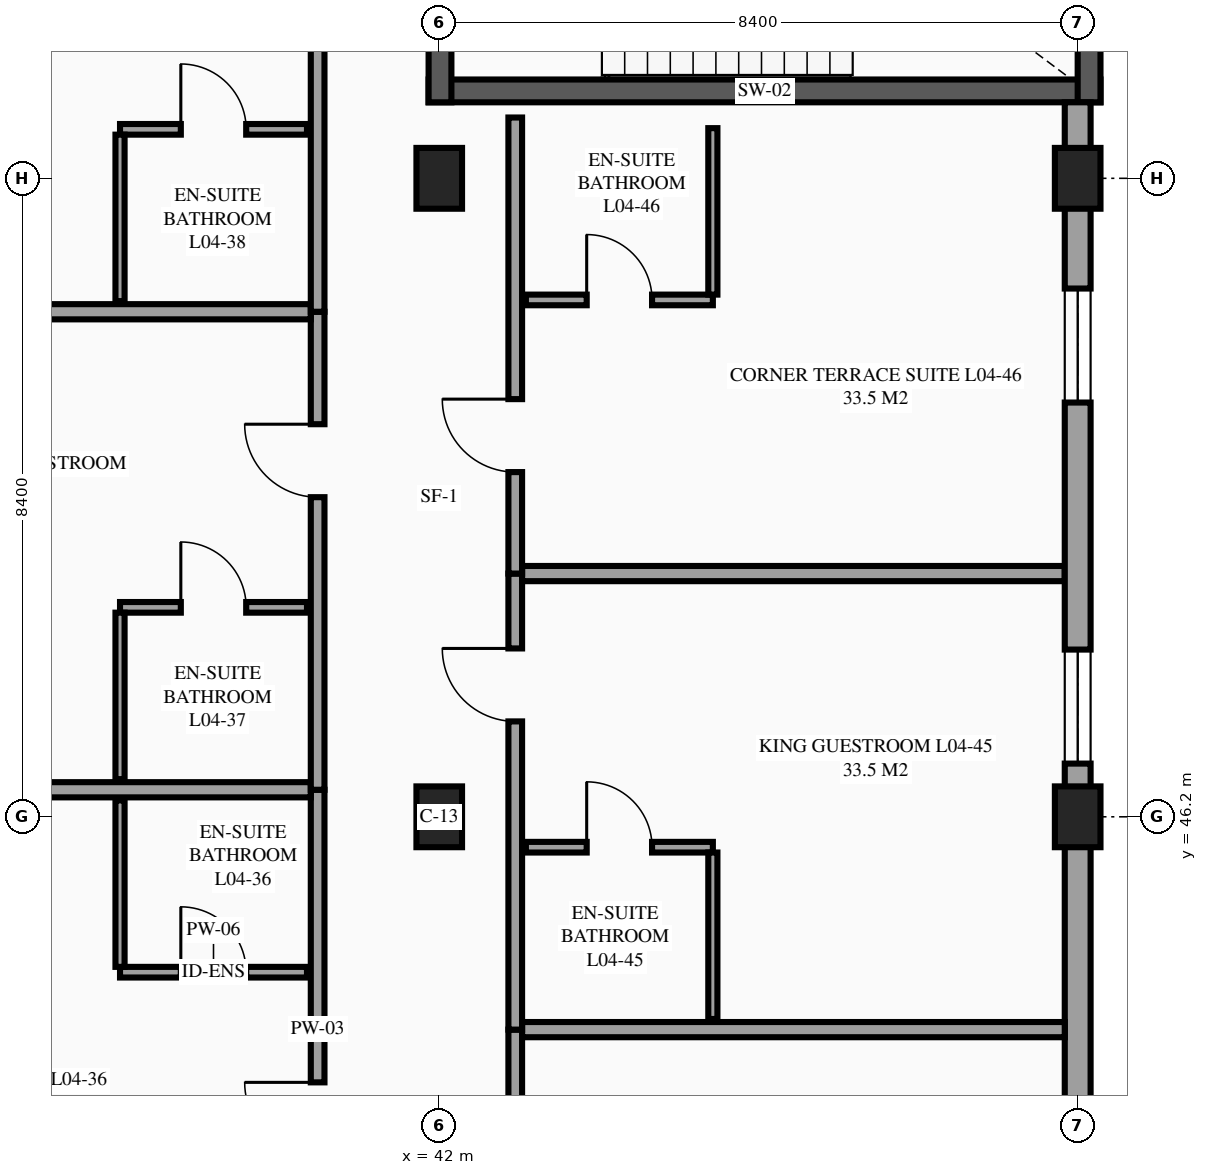
"""IFC4 building model, lengths in metres.
Left out: names, types, materials, properties, quantities, classifications, styles, units other than length and angle.
Written with IfcOpenShell. Run it as: python <this file> out.ifc"""

import sys

from ifc_helpers import new_model, si_unit, direction, frame, frame_2d, origin, origin_2d, place, context, subcontext, project, spatial, rectangle, extrude, element, fill, save


model = new_model("IFC4")
c1 = context("Model", 3, precision=1e-05, world=origin(), true_north=direction((0.0, 1.0)))
c2 = subcontext(c1, "Body", "Model", "MODEL_VIEW")
j1 = project(units=[si_unit("LENGTHUNIT", "METRE"), si_unit("PLANEANGLEUNIT", "RADIAN")], contexts=[c1])
p1 = place(None, origin())
s1 = spatial("IfcSite", under=j1, at=p1, CompositionType="ELEMENT")
p2 = place(p1, origin())
s2 = spatial("IfcBuilding", under=s1, at=p2, CompositionType="ELEMENT")
p3 = place(p2, frame((0.0, 0.0, 18.3)))
s3 = spatial("IfcBuildingStorey", under=s2, at=p3, CompositionType="ELEMENT", Elevation=18.3)
for number, where, z_axis, x_axis in (
    (1, (42.0, 46.2, 0.0), (0.0, 0.0, 1.0), (1.0, 0.0, 0.0)),
    (2, (42.0, 54.6, 0.0), (0.0, 0.0, 1.0), (1.0, 0.0, 0.0)),
    (3, (50.4, 46.2, 0.0), (0.0, 0.0, 1.0), (1.0, 0.0, 0.0)),
    (4, (50.4, 54.6, 0.0), (0.0, 0.0, 1.0), (1.0, 0.0, 0.0)),
):
    element("IfcColumn", number, at=place(p3, frame(where, z_axis=z_axis, x_axis=x_axis)), inside=s3, PredefinedType="COLUMN", context=c2, shape_type="SweptSolid", body=[
        extrude(rectangle(XDim=0.6, YDim=0.8, at=origin_2d()), origin(), (0.0, 0.0, 1.0), 3.6),
    ])
p4 = place(p3, frame((50.4, 37.8, 0.0), z_axis=(0.0, 0.0, 1.0), x_axis=(0.0, 1.0, 0.0)))
e5 = element("IfcWall", 5, at=p4, inside=s3, PredefinedType="STANDARD", context=c2, shape_type="SweptSolid", body=[
    extrude(rectangle(XDim=8.4, YDim=0.34, at=frame_2d((4.2, 0.0))), origin(), (0.0, 0.0, 1.0), 3.075),
])
p5 = place(p4, frame((1.85, 0.0, 0.85)))
e6 = element("IfcOpeningElement", 6, at=p5, cuts=e5, PredefinedType="OPENING", context=c2, shape_type="SweptSolid", body=[
    extrude(rectangle(XDim=1.5, YDim=1.5, at=frame_2d((0.75, 0.75))), frame((0.0, 0.18, 0.0), z_axis=(0.0, -1.0, 0.0), x_axis=(1.0, 0.0, 0.0)), (0.0, 0.0, 1.0), 0.36),
])
p6 = place(p3, frame((41.86, 55.75, 0.0), z_axis=(0.0, 0.0, 1.0), x_axis=(1.0, 0.0, 0.0)))
e7 = element("IfcWall", 7, at=p6, inside=s3, PredefinedType="SHEAR", context=c2, shape_type="SweptSolid", body=[
    extrude(rectangle(XDim=8.84, YDim=0.3, at=frame_2d((4.42, 0.0))), origin(), (0.0, 0.0, 1.0), 3.6),
])
p7 = place(p3, frame((50.55, 55.6, 0.0), z_axis=(0.0, 0.0, 1.0), x_axis=(0.0, 1.0, 0.0)))
e8 = element("IfcWall", 8, at=p7, inside=s3, PredefinedType="SHEAR", context=c2, shape_type="SweptSolid", body=[
    extrude(rectangle(XDim=5.2, YDim=0.3, at=frame_2d((2.6, 0.0))), origin(), (0.0, 0.0, 1.0), 3.6),
])
p8 = place(p3, frame((42.01, 60.8, 0.0), z_axis=(0.0, 0.0, 1.0), x_axis=(0.0, -1.0, 0.0)))
e9 = element("IfcWall", 9, at=p8, inside=s3, PredefinedType="SHEAR", context=c2, shape_type="SweptSolid", body=[
    extrude(rectangle(XDim=5.2, YDim=0.3, at=frame_2d((2.6, 0.0))), origin(), (0.0, 0.0, 1.0), 3.6),
])
p9 = place(p8, frame((3.0, 0.0, 0.0)))
e10 = element("IfcOpeningElement", 10, at=p9, cuts=e9, PredefinedType="OPENING", context=c2, shape_type="SweptSolid", body=[
    extrude(rectangle(XDim=1.15, YDim=2.15, at=frame_2d((0.575, 1.075))), frame((0.0, 0.16, 0.0), z_axis=(0.0, -1.0, 0.0), x_axis=(1.0, 0.0, 0.0)), (0.0, 0.0, 1.0), 0.32),
])
p10 = place(p3, frame((40.4, 40.267, 0.0), z_axis=(0.0, 0.0, 1.0), x_axis=(0.0, 1.0, 0.0)))
e11 = element("IfcWall", 11, at=p10, inside=s3, PredefinedType="PARTITIONING", context=c2, shape_type="SweptSolid", body=[
    extrude(rectangle(XDim=6.289, YDim=0.18, at=frame_2d((3.145, 0.0))), origin(), (0.0, 0.0, 1.0), 3.375),
])
p11 = place(p10, frame((1.479, 0.0, 0.0)))
e12 = element("IfcOpeningElement", 12, at=p11, cuts=e11, PredefinedType="OPENING", context=c2, shape_type="SweptSolid", body=[
    extrude(rectangle(XDim=0.96, YDim=2.15, at=frame_2d((0.48, 1.075))), frame((0.0, 0.1, 0.0), z_axis=(0.0, -1.0, 0.0), x_axis=(1.0, 0.0, 0.0)), (0.0, 0.0, 1.0), 0.2),
])
p12 = place(p3, frame((34.05, 46.556, 0.0), z_axis=(0.0, 0.0, 1.0), x_axis=(1.0, 0.0, 0.0)))
e13 = element("IfcWall", 13, at=p12, inside=s3, PredefinedType="PARTITIONING", context=c2, shape_type="SweptSolid", body=[
    extrude(rectangle(XDim=6.26, YDim=0.2, at=frame_2d((3.13, 0.0))), origin(), (0.0, 0.0, 1.0), 3.375),
])
p13 = place(p3, frame((37.8, 44.156, 0.0), z_axis=(0.0, 0.0, 1.0), x_axis=(1.0, 0.0, 0.0)))
e14 = element("IfcWall", 14, at=p13, inside=s3, PredefinedType="PARTITIONING", context=c2, shape_type="SweptSolid", body=[
    extrude(rectangle(XDim=2.46, YDim=0.14, at=frame_2d((1.23, 0.0))), origin(), (0.0, 0.0, 1.0), 3.375),
])
p14 = place(p13, frame((0.8, 0.0, 0.0)))
e15 = element("IfcOpeningElement", 15, at=p14, cuts=e14, PredefinedType="OPENING", context=c2, shape_type="SweptSolid", body=[
    extrude(rectangle(XDim=0.86, YDim=2.1, at=frame_2d((0.43, 1.05))), frame((0.0, 0.08, 0.0), z_axis=(0.0, -1.0, 0.0), x_axis=(1.0, 0.0, 0.0)), (0.0, 0.0, 1.0), 0.16),
])
p15 = place(p3, frame((37.8, 44.226, 0.0), z_axis=(0.0, 0.0, 1.0), x_axis=(0.0, 1.0, 0.0)))
e16 = element("IfcWall", 16, at=p15, inside=s3, PredefinedType="PARTITIONING", context=c2, shape_type="SweptSolid", body=[
    extrude(rectangle(XDim=2.19, YDim=0.12, at=frame_2d((1.095, 0.0))), origin(), (0.0, 0.0, 1.0), 3.375),
])
p16 = place(p3, frame((40.4, 46.556, 0.0), z_axis=(0.0, 0.0, 1.0), x_axis=(0.0, 1.0, 0.0)))
e17 = element("IfcWall", 17, at=p16, inside=s3, PredefinedType="PARTITIONING", context=c2, shape_type="SweptSolid", body=[
    extrude(rectangle(XDim=6.289, YDim=0.18, at=frame_2d((3.145, 0.0))), origin(), (0.0, 0.0, 1.0), 3.375),
])
p17 = place(p16, frame((3.849, 0.0, 0.0)))
e18 = element("IfcOpeningElement", 18, at=p17, cuts=e17, PredefinedType="OPENING", context=c2, shape_type="SweptSolid", body=[
    extrude(rectangle(XDim=0.96, YDim=2.15, at=frame_2d((0.48, 1.075))), frame((0.0, 0.1, 0.0), z_axis=(0.0, -1.0, 0.0), x_axis=(1.0, 0.0, 0.0)), (0.0, 0.0, 1.0), 0.2),
])
p18 = place(p3, frame((33.77, 52.844, 0.0), z_axis=(0.0, 0.0, 1.0), x_axis=(1.0, 0.0, 0.0)))
e19 = element("IfcWall", 19, at=p18, inside=s3, PredefinedType="PARTITIONING", context=c2, shape_type="SweptSolid", body=[
    extrude(rectangle(XDim=6.54, YDim=0.2, at=frame_2d((3.27, 0.0))), origin(), (0.0, 0.0, 1.0), 3.375),
])
p19 = place(p3, frame((37.8, 48.956, 0.0), z_axis=(0.0, 0.0, 1.0), x_axis=(1.0, 0.0, 0.0)))
e20 = element("IfcWall", 20, at=p19, inside=s3, PredefinedType="PARTITIONING", context=c2, shape_type="SweptSolid", body=[
    extrude(rectangle(XDim=2.46, YDim=0.14, at=frame_2d((1.23, 0.0))), origin(), (0.0, 0.0, 1.0), 3.375),
])
p20 = place(p19, frame((0.8, 0.0, 0.0)))
e21 = element("IfcOpeningElement", 21, at=p20, cuts=e20, PredefinedType="OPENING", context=c2, shape_type="SweptSolid", body=[
    extrude(rectangle(XDim=0.86, YDim=2.1, at=frame_2d((0.43, 1.05))), frame((0.0, 0.08, 0.0), z_axis=(0.0, -1.0, 0.0), x_axis=(1.0, 0.0, 0.0)), (0.0, 0.0, 1.0), 0.16),
])
p21 = place(p3, frame((37.8, 46.696, 0.0), z_axis=(0.0, 0.0, 1.0), x_axis=(0.0, 1.0, 0.0)))
e22 = element("IfcWall", 22, at=p21, inside=s3, PredefinedType="PARTITIONING", context=c2, shape_type="SweptSolid", body=[
    extrude(rectangle(XDim=2.19, YDim=0.12, at=frame_2d((1.095, 0.0))), origin(), (0.0, 0.0, 1.0), 3.375),
])
p22 = place(p3, frame((40.4, 52.844, 0.0), z_axis=(0.0, 0.0, 1.0), x_axis=(0.0, 1.0, 0.0)))
e23 = element("IfcWall", 23, at=p22, inside=s3, PredefinedType="PARTITIONING", context=c2, shape_type="SweptSolid", body=[
    extrude(rectangle(XDim=6.289, YDim=0.18, at=frame_2d((3.145, 0.0))), origin(), (0.0, 0.0, 1.0), 3.375),
])
p23 = place(p22, frame((3.85, 0.0, 0.0)))
e24 = element("IfcOpeningElement", 24, at=p23, cuts=e23, PredefinedType="OPENING", context=c2, shape_type="SweptSolid", body=[
    extrude(rectangle(XDim=0.96, YDim=2.15, at=frame_2d((0.48, 1.075))), frame((0.0, 0.1, 0.0), z_axis=(0.0, -1.0, 0.0), x_axis=(1.0, 0.0, 0.0)), (0.0, 0.0, 1.0), 0.2),
])
p24 = place(p3, frame((37.8, 55.244, 0.0), z_axis=(0.0, 0.0, 1.0), x_axis=(1.0, 0.0, 0.0)))
e25 = element("IfcWall", 25, at=p24, inside=s3, PredefinedType="PARTITIONING", context=c2, shape_type="SweptSolid", body=[
    extrude(rectangle(XDim=2.46, YDim=0.14, at=frame_2d((1.23, 0.0))), origin(), (0.0, 0.0, 1.0), 3.375),
])
p25 = place(p24, frame((0.8, 0.0, 0.0)))
e26 = element("IfcOpeningElement", 26, at=p25, cuts=e25, PredefinedType="OPENING", context=c2, shape_type="SweptSolid", body=[
    extrude(rectangle(XDim=0.86, YDim=2.1, at=frame_2d((0.43, 1.05))), frame((0.0, 0.08, 0.0), z_axis=(0.0, -1.0, 0.0), x_axis=(1.0, 0.0, 0.0)), (0.0, 0.0, 1.0), 0.16),
])
p26 = place(p3, frame((37.8, 52.984, 0.0), z_axis=(0.0, 0.0, 1.0), x_axis=(0.0, 1.0, 0.0)))
e27 = element("IfcWall", 27, at=p26, inside=s3, PredefinedType="PARTITIONING", context=c2, shape_type="SweptSolid", body=[
    extrude(rectangle(XDim=2.19, YDim=0.12, at=frame_2d((1.095, 0.0))), origin(), (0.0, 0.0, 1.0), 3.375),
])
p27 = place(p3, frame((43.0, 37.4, 0.0), z_axis=(0.0, 0.0, 1.0), x_axis=(0.0, 1.0, 0.0)))
e28 = element("IfcWall", 28, at=p27, inside=s3, PredefinedType="PARTITIONING", context=c2, shape_type="SweptSolid", body=[
    extrude(rectangle(XDim=6.0, YDim=0.18, at=frame_2d((3.0, 0.0))), origin(), (0.0, 0.0, 1.0), 3.375),
])
p28 = place(p27, frame((3.705, 0.0, 0.0)))
e29 = element("IfcOpeningElement", 29, at=p28, cuts=e28, PredefinedType="OPENING", context=c2, shape_type="SweptSolid", body=[
    extrude(rectangle(XDim=0.96, YDim=2.15, at=frame_2d((0.48, 1.075))), frame((0.0, 0.1, 0.0), z_axis=(0.0, -1.0, 0.0), x_axis=(1.0, 0.0, 0.0)), (0.0, 0.0, 1.0), 0.2),
])
p29 = place(p3, frame((43.09, 43.4, 0.0), z_axis=(0.0, 0.0, 1.0), x_axis=(1.0, 0.0, 0.0)))
e30 = element("IfcWall", 30, at=p29, inside=s3, PredefinedType="PARTITIONING", context=c2, shape_type="SweptSolid", body=[
    extrude(rectangle(XDim=7.14, YDim=0.2, at=frame_2d((3.57, 0.0))), origin(), (0.0, 0.0, 1.0), 3.375),
])
p30 = place(p3, frame((43.0, 43.4, 0.0), z_axis=(0.0, 0.0, 1.0), x_axis=(0.0, 1.0, 0.0)))
e31 = element("IfcWall", 31, at=p30, inside=s3, PredefinedType="PARTITIONING", context=c2, shape_type="SweptSolid", body=[
    extrude(rectangle(XDim=6.0, YDim=0.18, at=frame_2d((3.0, 0.0))), origin(), (0.0, 0.0, 1.0), 3.375),
])
p31 = place(p30, frame((4.055, 0.0, 0.0)))
e32 = element("IfcOpeningElement", 32, at=p31, cuts=e31, PredefinedType="OPENING", context=c2, shape_type="SweptSolid", body=[
    extrude(rectangle(XDim=0.96, YDim=2.15, at=frame_2d((0.48, 1.075))), frame((0.0, 0.1, 0.0), z_axis=(0.0, -1.0, 0.0), x_axis=(1.0, 0.0, 0.0)), (0.0, 0.0, 1.0), 0.2),
])
p32 = place(p3, frame((43.09, 49.4, 0.0), z_axis=(0.0, 0.0, 1.0), x_axis=(1.0, 0.0, 0.0)))
e33 = element("IfcWall", 33, at=p32, inside=s3, PredefinedType="PARTITIONING", context=c2, shape_type="SweptSolid", body=[
    extrude(rectangle(XDim=7.14, YDim=0.2, at=frame_2d((3.57, 0.0))), origin(), (0.0, 0.0, 1.0), 3.375),
])
p33 = place(p3, frame((43.14, 45.8, 0.0), z_axis=(0.0, 0.0, 1.0), x_axis=(1.0, 0.0, 0.0)))
e34 = element("IfcWall", 34, at=p33, inside=s3, PredefinedType="PARTITIONING", context=c2, shape_type="SweptSolid", body=[
    extrude(rectangle(XDim=2.46, YDim=0.14, at=frame_2d((1.23, 0.0))), origin(), (0.0, 0.0, 1.0), 3.375),
])
p34 = place(p33, frame((0.8, 0.0, 0.0)))
e35 = element("IfcOpeningElement", 35, at=p34, cuts=e34, PredefinedType="OPENING", context=c2, shape_type="SweptSolid", body=[
    extrude(rectangle(XDim=0.86, YDim=2.1, at=frame_2d((0.43, 1.05))), frame((0.0, 0.08, 0.0), z_axis=(0.0, -1.0, 0.0), x_axis=(1.0, 0.0, 0.0)), (0.0, 0.0, 1.0), 0.16),
])
p35 = place(p3, frame((45.6, 43.54, 0.0), z_axis=(0.0, 0.0, 1.0), x_axis=(0.0, 1.0, 0.0)))
e36 = element("IfcWall", 36, at=p35, inside=s3, PredefinedType="PARTITIONING", context=c2, shape_type="SweptSolid", body=[
    extrude(rectangle(XDim=2.19, YDim=0.12, at=frame_2d((1.095, 0.0))), origin(), (0.0, 0.0, 1.0), 3.375),
])
p36 = place(p3, frame((43.0, 49.4, 0.0), z_axis=(0.0, 0.0, 1.0), x_axis=(0.0, 1.0, 0.0)))
e37 = element("IfcWall", 37, at=p36, inside=s3, PredefinedType="PARTITIONING", context=c2, shape_type="SweptSolid", body=[
    extrude(rectangle(XDim=6.0, YDim=0.18, at=frame_2d((3.0, 0.0))), origin(), (0.0, 0.0, 1.0), 3.375),
])
p37 = place(p36, frame((1.335, 0.0, 0.0)))
e38 = element("IfcOpeningElement", 38, at=p37, cuts=e37, PredefinedType="OPENING", context=c2, shape_type="SweptSolid", body=[
    extrude(rectangle(XDim=0.96, YDim=2.15, at=frame_2d((0.48, 1.075))), frame((0.0, 0.1, 0.0), z_axis=(0.0, -1.0, 0.0), x_axis=(1.0, 0.0, 0.0)), (0.0, 0.0, 1.0), 0.2),
])
p38 = place(p3, frame((43.14, 53.0, 0.0), z_axis=(0.0, 0.0, 1.0), x_axis=(1.0, 0.0, 0.0)))
e39 = element("IfcWall", 39, at=p38, inside=s3, PredefinedType="PARTITIONING", context=c2, shape_type="SweptSolid", body=[
    extrude(rectangle(XDim=2.46, YDim=0.14, at=frame_2d((1.23, 0.0))), origin(), (0.0, 0.0, 1.0), 3.375),
])
p39 = place(p38, frame((0.8, 0.0, 0.0)))
e40 = element("IfcOpeningElement", 40, at=p39, cuts=e39, PredefinedType="OPENING", context=c2, shape_type="SweptSolid", body=[
    extrude(rectangle(XDim=0.86, YDim=2.1, at=frame_2d((0.43, 1.05))), frame((0.0, 0.08, 0.0), z_axis=(0.0, -1.0, 0.0), x_axis=(1.0, 0.0, 0.0)), (0.0, 0.0, 1.0), 0.16),
])
p40 = place(p3, frame((45.6, 53.07, 0.0), z_axis=(0.0, 0.0, 1.0), x_axis=(0.0, 1.0, 0.0)))
e41 = element("IfcWall", 41, at=p40, inside=s3, PredefinedType="PARTITIONING", context=c2, shape_type="SweptSolid", body=[
    extrude(rectangle(XDim=2.19, YDim=0.12, at=frame_2d((1.095, 0.0))), origin(), (0.0, 0.0, 1.0), 3.375),
])
p41 = place(p3, frame((50.4, 46.2, 0.0), z_axis=(0.0, 0.0, 1.0), x_axis=(0.0, 1.0, 0.0)))
e42 = element("IfcWall", 42, at=p41, inside=s3, PredefinedType="STANDARD", context=c2, shape_type="SweptSolid", body=[
    extrude(rectangle(XDim=8.4, YDim=0.34, at=frame_2d((4.2, 0.0))), origin(), (0.0, 0.0, 1.0), 2.78),
])
p42 = place(p41, frame((0.7, 0.0, 0.85)))
e43 = element("IfcOpeningElement", 43, at=p42, cuts=e42, PredefinedType="OPENING", context=c2, shape_type="SweptSolid", body=[
    extrude(rectangle(XDim=1.5, YDim=1.5, at=frame_2d((0.75, 0.75))), frame((0.0, 0.18, 0.0), z_axis=(0.0, -1.0, 0.0), x_axis=(1.0, 0.0, 0.0)), (0.0, 0.0, 1.0), 0.36),
])
p43 = place(p41, frame((5.45, 0.0, 0.85)))
e44 = element("IfcOpeningElement", 44, at=p43, cuts=e42, PredefinedType="OPENING", context=c2, shape_type="SweptSolid", body=[
    extrude(rectangle(XDim=1.5, YDim=1.5, at=frame_2d((0.75, 0.75))), frame((0.0, 0.18, 0.0), z_axis=(0.0, -1.0, 0.0), x_axis=(1.0, 0.0, 0.0)), (0.0, 0.0, 1.0), 0.36),
])
p44 = place(p3, frame((50.4, 54.6, 0.0), z_axis=(0.0, 0.0, 1.0), x_axis=(0.0, 1.0, 0.0)))
e45 = element("IfcWall", 45, at=p44, inside=s3, PredefinedType="STANDARD", context=c2, shape_type="SweptSolid", body=[
    extrude(rectangle(XDim=1.0, YDim=0.34, at=frame_2d((0.5, 0.0))), origin(), (0.0, 0.0, 1.0), 2.43),
])
p45 = place(p42, origin())
e46 = element("IfcWindow", 46, at=p45, inside=s3, PartitioningType="SINGLE_PANEL", PredefinedType="WINDOW", context=c2, shape_type="SweptSolid", body=[
    extrude(rectangle(XDim=1.5, YDim=1.5, at=frame_2d((0.75, 0.75))), frame((0.0, 0.03, 0.0), z_axis=(0.0, -1.0, 0.0), x_axis=(1.0, 0.0, 0.0)), (0.0, 0.0, 1.0), 0.06),
])
fill(e43, e46)
p46 = place(p43, origin())
e47 = element("IfcWindow", 47, at=p46, inside=s3, PartitioningType="SINGLE_PANEL", PredefinedType="WINDOW", context=c2, shape_type="SweptSolid", body=[
    extrude(rectangle(XDim=1.5, YDim=1.5, at=frame_2d((0.75, 0.75))), frame((0.0, 0.03, 0.0), z_axis=(0.0, -1.0, 0.0), x_axis=(1.0, 0.0, 0.0)), (0.0, 0.0, 1.0), 0.06),
])
fill(e44, e47)
p47 = place(p11, origin())
e48 = element("IfcDoor", 48, at=p47, inside=s3, OperationType="SINGLE_SWING_RIGHT", PredefinedType="DOOR", context=c2, shape_type="SweptSolid", body=[
    extrude(rectangle(XDim=0.96, YDim=2.15, at=frame_2d((0.48, 1.075))), frame((0.0, 0.025, 0.0), z_axis=(0.0, -1.0, 0.0), x_axis=(1.0, 0.0, 0.0)), (0.0, 0.0, 1.0), 0.05),
])
fill(e12, e48)
p48 = place(p14, origin())
e49 = element("IfcDoor", 49, at=p48, inside=s3, OperationType="SINGLE_SWING_LEFT", PredefinedType="DOOR", context=c2, shape_type="SweptSolid", body=[
    extrude(rectangle(XDim=0.86, YDim=2.1, at=frame_2d((0.43, 1.05))), frame((0.0, 0.025, 0.0), z_axis=(0.0, -1.0, 0.0), x_axis=(1.0, 0.0, 0.0)), (0.0, 0.0, 1.0), 0.05),
])
fill(e15, e49)
p49 = place(p17, origin())
e50 = element("IfcDoor", 50, at=p49, inside=s3, OperationType="SINGLE_SWING_RIGHT", PredefinedType="DOOR", context=c2, shape_type="SweptSolid", body=[
    extrude(rectangle(XDim=0.96, YDim=2.15, at=frame_2d((0.48, 1.075))), frame((0.0, 0.025, 0.0), z_axis=(0.0, -1.0, 0.0), x_axis=(1.0, 0.0, 0.0)), (0.0, 0.0, 1.0), 0.05),
])
fill(e18, e50)
p50 = place(p20, origin())
e51 = element("IfcDoor", 51, at=p50, inside=s3, OperationType="SINGLE_SWING_LEFT", PredefinedType="DOOR", context=c2, shape_type="SweptSolid", body=[
    extrude(rectangle(XDim=0.86, YDim=2.1, at=frame_2d((0.43, 1.05))), frame((0.0, 0.025, 0.0), z_axis=(0.0, -1.0, 0.0), x_axis=(1.0, 0.0, 0.0)), (0.0, 0.0, 1.0), 0.05),
])
fill(e21, e51)
p51 = place(p25, origin())
e52 = element("IfcDoor", 52, at=p51, inside=s3, OperationType="SINGLE_SWING_LEFT", PredefinedType="DOOR", context=c2, shape_type="SweptSolid", body=[
    extrude(rectangle(XDim=0.86, YDim=2.1, at=frame_2d((0.43, 1.05))), frame((0.0, 0.025, 0.0), z_axis=(0.0, -1.0, 0.0), x_axis=(1.0, 0.0, 0.0)), (0.0, 0.0, 1.0), 0.05),
])
fill(e26, e52)
p52 = place(p31, origin())
e53 = element("IfcDoor", 53, at=p52, inside=s3, OperationType="SINGLE_SWING_RIGHT", PredefinedType="DOOR", context=c2, shape_type="SweptSolid", body=[
    extrude(rectangle(XDim=0.96, YDim=2.15, at=frame_2d((0.48, 1.075))), frame((0.0, 0.025, 0.0), z_axis=(0.0, -1.0, 0.0), x_axis=(1.0, 0.0, 0.0)), (0.0, 0.0, 1.0), 0.05),
])
fill(e32, e53)
p53 = place(p34, origin())
e54 = element("IfcDoor", 54, at=p53, inside=s3, OperationType="SINGLE_SWING_LEFT", PredefinedType="DOOR", context=c2, shape_type="SweptSolid", body=[
    extrude(rectangle(XDim=0.86, YDim=2.1, at=frame_2d((0.43, 1.05))), frame((0.0, 0.025, 0.0), z_axis=(0.0, -1.0, 0.0), x_axis=(1.0, 0.0, 0.0)), (0.0, 0.0, 1.0), 0.05),
])
fill(e35, e54)
p54 = place(p37, origin())
e55 = element("IfcDoor", 55, at=p54, inside=s3, OperationType="SINGLE_SWING_RIGHT", PredefinedType="DOOR", context=c2, shape_type="SweptSolid", body=[
    extrude(rectangle(XDim=0.96, YDim=2.15, at=frame_2d((0.48, 1.075))), frame((0.0, 0.025, 0.0), z_axis=(0.0, -1.0, 0.0), x_axis=(1.0, 0.0, 0.0)), (0.0, 0.0, 1.0), 0.05),
])
fill(e38, e55)
p55 = place(p39, origin())
e56 = element("IfcDoor", 56, at=p55, inside=s3, OperationType="SINGLE_SWING_LEFT", PredefinedType="DOOR", context=c2, shape_type="SweptSolid", body=[
    extrude(rectangle(XDim=0.86, YDim=2.1, at=frame_2d((0.43, 1.05))), frame((0.0, 0.025, 0.0), z_axis=(0.0, -1.0, 0.0), x_axis=(1.0, 0.0, 0.0)), (0.0, 0.0, 1.0), 0.05),
])
fill(e40, e56)
save(model, sys.argv[1])
